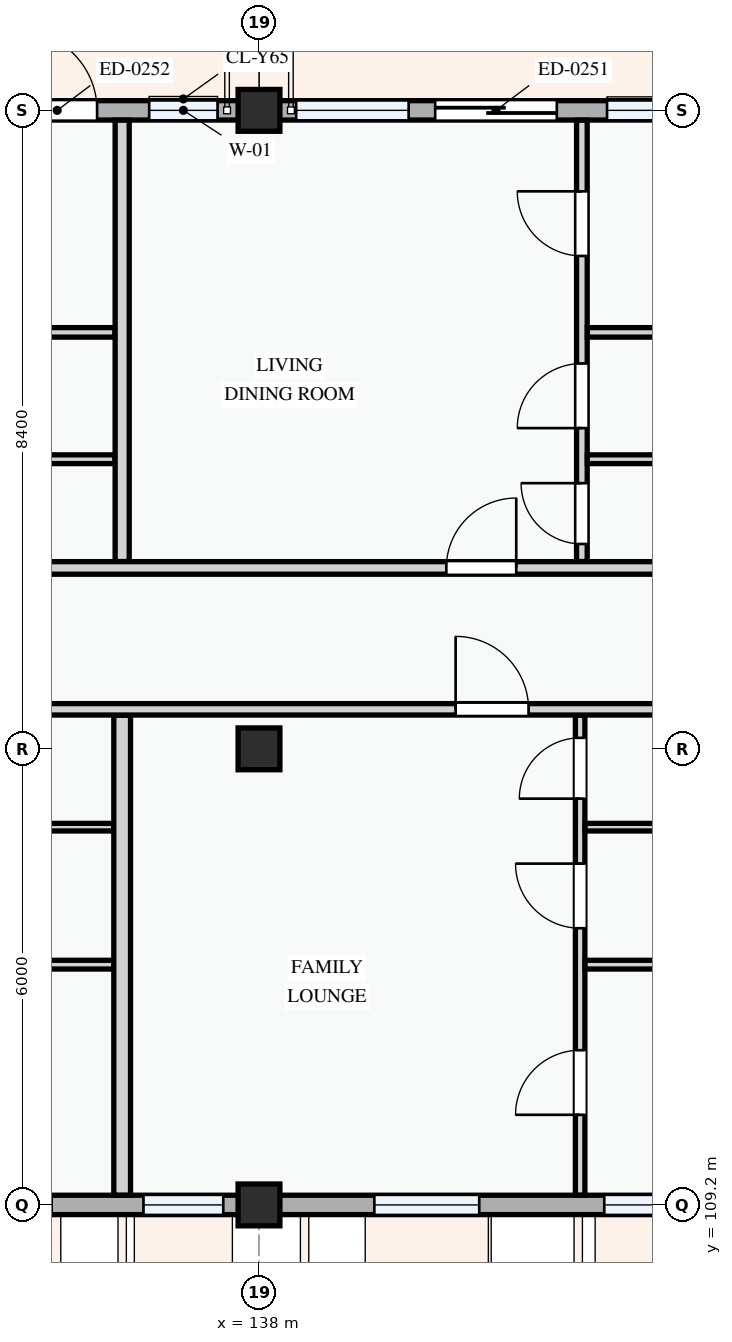
"""IFC4 building model, lengths in metres.
Left out: names, types, materials, properties, quantities, classifications, styles, units other than length and angle.
Written with IfcOpenShell. Run it as: python <this file> out.ifc"""

import sys

from ifc_helpers import new_model, si_unit, direction, frame, frame_2d, origin, origin_2d, place, context, subcontext, project, spatial, rectangle, extrude, element, fill, save


model = new_model("IFC4")
c1 = context("Model", 3, precision=1e-05, world=origin(), true_north=direction((0.0, 1.0)))
c2 = subcontext(c1, "Body", "Model", "MODEL_VIEW")
j1 = project(units=[si_unit("LENGTHUNIT", "METRE"), si_unit("PLANEANGLEUNIT", "RADIAN")], contexts=[c1])
p1 = place(None, origin())
s1 = spatial("IfcSite", under=j1, at=p1, CompositionType="ELEMENT")
p2 = place(p1, origin())
s2 = spatial("IfcBuilding", under=s1, at=p2, CompositionType="ELEMENT")
p3 = place(p2, frame((0.0, 0.0, 34.5)))
s3 = spatial("IfcBuildingStorey", under=s2, at=p3, CompositionType="ELEMENT", Elevation=34.5)
for number, where, z_axis, x_axis in (
    (1, (138.0, 109.2, 0.0), (0.0, 0.0, 1.0), (1.0, 0.0, 0.0)),
    (2, (138.0, 115.2, 0.0), (0.0, 0.0, 1.0), (1.0, 0.0, 0.0)),
    (3, (138.0, 123.6, 0.0), (0.0, 0.0, 1.0), (1.0, 0.0, 0.0)),
):
    element("IfcColumn", number, at=place(p3, frame(where, z_axis=z_axis, x_axis=x_axis)), inside=s3, PredefinedType="COLUMN", context=c2, shape_type="SweptSolid", body=[
        extrude(rectangle(XDim=0.55, YDim=0.55, at=origin_2d()), origin(), (0.0, 0.0, 1.0), 3.3),
    ])
p4 = place(p3, frame((144.0, 123.6, 0.0), z_axis=(0.0, 0.0, 1.0), x_axis=(-1.0, 0.0, 0.0)))
e4 = element("IfcWall", 4, at=p4, inside=s3, PredefinedType="STANDARD", context=c2, shape_type="SweptSolid", body=[
    extrude(rectangle(XDim=6.0, YDim=0.255, at=frame_2d((3.0, 0.0))), origin(), (0.0, 0.0, 1.0), 2.445),
])
p5 = place(p4, frame((2.082, 0.0, 0.0)))
e5 = element("IfcOpeningElement", 5, at=p5, cuts=e4, PredefinedType="OPENING", context=c2, shape_type="SweptSolid", body=[
    extrude(rectangle(XDim=1.6, YDim=2.2, at=frame_2d((0.8, 1.1))), frame((0.0, 0.137, 0.0), z_axis=(0.0, -1.0, 0.0), x_axis=(1.0, 0.0, 0.0)), (0.0, 0.0, 1.0), 0.275),
])
p6 = place(p4, frame((0.521, 0.0, 0.78)))
e6 = element("IfcOpeningElement", 6, at=p6, cuts=e4, PredefinedType="OPENING", context=c2, shape_type="SweptSolid", body=[
    extrude(rectangle(XDim=0.9, YDim=1.2, at=frame_2d((0.45, 0.6))), frame((0.0, 0.137, 0.0), z_axis=(0.0, -1.0, 0.0), x_axis=(1.0, 0.0, 0.0)), (0.0, 0.0, 1.0), 0.275),
])
p7 = place(p4, frame((4.031, 0.0, 0.78)))
e7 = element("IfcOpeningElement", 7, at=p7, cuts=e4, PredefinedType="OPENING", context=c2, shape_type="SweptSolid", body=[
    extrude(rectangle(XDim=1.48, YDim=1.52, at=frame_2d((0.74, 0.76))), frame((0.0, 0.137, 0.0), z_axis=(0.0, -1.0, 0.0), x_axis=(1.0, 0.0, 0.0)), (0.0, 0.0, 1.0), 0.275),
])
p8 = place(p3, frame((138.0, 123.6, 0.0), z_axis=(0.0, 0.0, 1.0), x_axis=(-1.0, 0.0, 0.0)))
e8 = element("IfcWall", 8, at=p8, inside=s3, PredefinedType="STANDARD", context=c2, shape_type="SweptSolid", body=[
    extrude(rectangle(XDim=8.4, YDim=0.255, at=frame_2d((4.2, 0.0))), origin(), (0.0, 0.0, 1.0), 2.345),
])
p9 = place(p8, frame((2.13, 0.0, 0.0)))
e9 = element("IfcOpeningElement", 9, at=p9, cuts=e8, PredefinedType="OPENING", context=c2, shape_type="SweptSolid", body=[
    extrude(rectangle(XDim=1.05, YDim=2.15, at=frame_2d((0.525, 1.075))), frame((0.0, 0.137, 0.0), z_axis=(0.0, -1.0, 0.0), x_axis=(1.0, 0.0, 0.0)), (0.0, 0.0, 1.0), 0.275),
])
p10 = place(p8, frame((0.545, 0.0, 0.78)))
e10 = element("IfcOpeningElement", 10, at=p10, cuts=e8, PredefinedType="OPENING", context=c2, shape_type="SweptSolid", body=[
    extrude(rectangle(XDim=0.9, YDim=1.2, at=frame_2d((0.45, 0.6))), frame((0.0, 0.137, 0.0), z_axis=(0.0, -1.0, 0.0), x_axis=(1.0, 0.0, 0.0)), (0.0, 0.0, 1.0), 0.275),
])
p11 = place(p8, frame((4.06, 0.0, 0.78)))
e11 = element("IfcOpeningElement", 11, at=p11, cuts=e8, PredefinedType="OPENING", context=c2, shape_type="SweptSolid", body=[
    extrude(rectangle(XDim=0.9, YDim=1.2, at=frame_2d((0.45, 0.6))), frame((0.0, 0.137, 0.0), z_axis=(0.0, -1.0, 0.0), x_axis=(1.0, 0.0, 0.0)), (0.0, 0.0, 1.0), 0.275),
])
p12 = place(p8, frame((6.055, 0.0, 0.78)))
e12 = element("IfcOpeningElement", 12, at=p12, cuts=e8, PredefinedType="OPENING", context=c2, shape_type="SweptSolid", body=[
    extrude(rectangle(XDim=1.75, YDim=1.45, at=frame_2d((0.875, 0.725))), frame((0.0, 0.137, 0.0), z_axis=(0.0, -1.0, 0.0), x_axis=(1.0, 0.0, 0.0)), (0.0, 0.0, 1.0), 0.275),
])
p13 = place(p3, frame((129.6, 109.2, 0.0), z_axis=(0.0, 0.0, 1.0), x_axis=(1.0, 0.0, 0.0)))
e13 = element("IfcWall", 13, at=p13, inside=s3, PredefinedType="STANDARD", context=c2, shape_type="SweptSolid", body=[
    extrude(rectangle(XDim=8.4, YDim=0.255, at=frame_2d((4.2, 0.0))), origin(), (0.0, 0.0, 1.0), 2.375),
])
p14 = place(p13, frame((1.353, 0.0, 0.78)))
e14 = element("IfcOpeningElement", 14, at=p14, cuts=e13, PredefinedType="OPENING", context=c2, shape_type="SweptSolid", body=[
    extrude(rectangle(XDim=0.95, YDim=1.15, at=frame_2d((0.475, 0.575))), frame((0.0, 0.137, 0.0), z_axis=(0.0, -1.0, 0.0), x_axis=(1.0, 0.0, 0.0)), (0.0, 0.0, 1.0), 0.275),
])
p15 = place(p13, frame((4.252, 0.0, 0.78)))
e15 = element("IfcOpeningElement", 15, at=p15, cuts=e13, PredefinedType="OPENING", context=c2, shape_type="SweptSolid", body=[
    extrude(rectangle(XDim=1.42, YDim=1.38, at=frame_2d((0.71, 0.69))), frame((0.0, 0.137, 0.0), z_axis=(0.0, -1.0, 0.0), x_axis=(1.0, 0.0, 0.0)), (0.0, 0.0, 1.0), 0.275),
])
p16 = place(p13, frame((6.88, 0.0, 0.78)))
e16 = element("IfcOpeningElement", 16, at=p16, cuts=e13, PredefinedType="OPENING", context=c2, shape_type="SweptSolid", body=[
    extrude(rectangle(XDim=1.05, YDim=1.2, at=frame_2d((0.525, 0.6))), frame((0.0, 0.137, 0.0), z_axis=(0.0, -1.0, 0.0), x_axis=(1.0, 0.0, 0.0)), (0.0, 0.0, 1.0), 0.275),
])
p17 = place(p3, frame((138.0, 109.2, 0.0), z_axis=(0.0, 0.0, 1.0), x_axis=(1.0, 0.0, 0.0)))
e17 = element("IfcWall", 17, at=p17, inside=s3, PredefinedType="STANDARD", context=c2, shape_type="SweptSolid", body=[
    extrude(rectangle(XDim=6.0, YDim=0.255, at=frame_2d((3.0, 0.0))), origin(), (0.0, 0.0, 1.0), 2.525),
])
p18 = place(p17, frame((1.518, 0.0, 0.78)))
e18 = element("IfcOpeningElement", 18, at=p18, cuts=e17, PredefinedType="OPENING", context=c2, shape_type="SweptSolid", body=[
    extrude(rectangle(XDim=1.38, YDim=1.48, at=frame_2d((0.69, 0.74))), frame((0.0, 0.137, 0.0), z_axis=(0.0, -1.0, 0.0), x_axis=(1.0, 0.0, 0.0)), (0.0, 0.0, 1.0), 0.275),
])
p19 = place(p17, frame((4.542, 0.0, 0.78)))
e19 = element("IfcOpeningElement", 19, at=p19, cuts=e17, PredefinedType="OPENING", context=c2, shape_type="SweptSolid", body=[
    extrude(rectangle(XDim=0.95, YDim=1.15, at=frame_2d((0.475, 0.575))), frame((0.0, 0.137, 0.0), z_axis=(0.0, -1.0, 0.0), x_axis=(1.0, 0.0, 0.0)), (0.0, 0.0, 1.0), 0.275),
])
p20 = place(p3, frame((127.879, 112.361, 0.0), z_axis=(0.0, 0.0, 1.0), x_axis=(1.0, 0.0, 0.0)))
e20 = element("IfcWall", 20, at=p20, inside=s3, PredefinedType="PARTITIONING", context=c2, shape_type="SweptSolid", body=[
    extrude(rectangle(XDim=8.208, YDim=0.115, at=frame_2d((4.104, 0.0))), origin(), (0.0, 0.0, 1.0), 3.0),
])
p21 = place(p3, frame((127.879, 114.17, 0.0), z_axis=(0.0, 0.0, 1.0), x_axis=(1.0, 0.0, 0.0)))
e21 = element("IfcWall", 21, at=p21, inside=s3, PredefinedType="PARTITIONING", context=c2, shape_type="SweptSolid", body=[
    extrude(rectangle(XDim=8.208, YDim=0.1, at=frame_2d((4.104, 0.0))), origin(), (0.0, 0.0, 1.0), 3.0),
])
p22 = place(p3, frame((127.9, 120.679, 0.0), z_axis=(0.0, 0.0, 1.0), x_axis=(1.0, 0.0, 0.0)))
e22 = element("IfcWall", 22, at=p22, inside=s3, PredefinedType="PARTITIONING", context=c2, shape_type="SweptSolid", body=[
    extrude(rectangle(XDim=8.206, YDim=0.125, at=frame_2d((4.103, 0.0))), origin(), (0.0, 0.0, 1.0), 3.0),
])
p23 = place(p3, frame((127.9, 119.01, 0.0), z_axis=(0.0, 0.0, 1.0), x_axis=(1.0, 0.0, 0.0)))
e23 = element("IfcWall", 23, at=p23, inside=s3, PredefinedType="PARTITIONING", context=c2, shape_type="SweptSolid", body=[
    extrude(rectangle(XDim=8.206, YDim=0.115, at=frame_2d((4.103, 0.0))), origin(), (0.0, 0.0, 1.0), 3.0),
])
p24 = place(p3, frame((142.225, 109.33, 0.0), z_axis=(0.0, 0.0, 1.0), x_axis=(0.0, 1.0, 0.0)))
e24 = element("IfcWall", 24, at=p24, inside=s3, PredefinedType="PARTITIONING", context=c2, shape_type="SweptSolid", body=[
    extrude(rectangle(XDim=6.313, YDim=0.125, at=frame_2d((3.157, 0.0))), origin(), (0.0, 0.0, 1.0), 3.0),
])
p25 = place(p24, frame((1.056, 0.0, 0.0)))
e25 = element("IfcOpeningElement", 25, at=p25, cuts=e24, PredefinedType="OPENING", context=c2, shape_type="SweptSolid", body=[
    extrude(rectangle(XDim=0.85, YDim=2.1, at=frame_2d((0.425, 1.05))), frame((0.0, 0.073, 0.0), z_axis=(0.0, -1.0, 0.0), x_axis=(1.0, 0.0, 0.0)), (0.0, 0.0, 1.0), 0.145),
])
p26 = place(p24, frame((3.511, 0.0, 0.0)))
e26 = element("IfcOpeningElement", 26, at=p26, cuts=e24, PredefinedType="OPENING", context=c2, shape_type="SweptSolid", body=[
    extrude(rectangle(XDim=0.85, YDim=2.1, at=frame_2d((0.425, 1.05))), frame((0.0, 0.073, 0.0), z_axis=(0.0, -1.0, 0.0), x_axis=(1.0, 0.0, 0.0)), (0.0, 0.0, 1.0), 0.145),
])
p27 = place(p24, frame((5.215, 0.0, 0.0)))
e27 = element("IfcOpeningElement", 27, at=p27, cuts=e24, PredefinedType="OPENING", context=c2, shape_type="SweptSolid", body=[
    extrude(rectangle(XDim=0.8, YDim=2.1, at=frame_2d((0.4, 1.05))), frame((0.0, 0.073, 0.0), z_axis=(0.0, -1.0, 0.0), x_axis=(1.0, 0.0, 0.0)), (0.0, 0.0, 1.0), 0.145),
])
p28 = place(p3, frame((142.29, 112.361, 0.0), z_axis=(0.0, 0.0, 1.0), x_axis=(1.0, 0.0, 0.0)))
e28 = element("IfcWall", 28, at=p28, inside=s3, PredefinedType="PARTITIONING", context=c2, shape_type="SweptSolid", body=[
    extrude(rectangle(XDim=7.683, YDim=0.115, at=frame_2d((3.842, 0.0))), origin(), (0.0, 0.0, 1.0), 3.0),
])
p29 = place(p3, frame((142.29, 114.17, 0.0), z_axis=(0.0, 0.0, 1.0), x_axis=(1.0, 0.0, 0.0)))
e29 = element("IfcWall", 29, at=p29, inside=s3, PredefinedType="PARTITIONING", context=c2, shape_type="SweptSolid", body=[
    extrude(rectangle(XDim=7.683, YDim=0.1, at=frame_2d((3.842, 0.0))), origin(), (0.0, 0.0, 1.0), 3.0),
])
p30 = place(p3, frame((142.248, 117.665, 0.0), z_axis=(0.0, 0.0, 1.0), x_axis=(0.0, 1.0, 0.0)))
e30 = element("IfcWall", 30, at=p30, inside=s3, PredefinedType="PARTITIONING", context=c2, shape_type="SweptSolid", body=[
    extrude(rectangle(XDim=5.806, YDim=0.14, at=frame_2d((2.903, 0.0))), origin(), (0.0, 0.0, 1.0), 3.0),
])
p31 = place(p30, frame((0.231, 0.0, 0.0)))
e31 = element("IfcOpeningElement", 31, at=p31, cuts=e30, PredefinedType="OPENING", context=c2, shape_type="SweptSolid", body=[
    extrude(rectangle(XDim=0.8, YDim=2.1, at=frame_2d((0.4, 1.05))), frame((0.0, 0.08, 0.0), z_axis=(0.0, -1.0, 0.0), x_axis=(1.0, 0.0, 0.0)), (0.0, 0.0, 1.0), 0.16),
])
p32 = place(p30, frame((1.755, 0.0, 0.0)))
e32 = element("IfcOpeningElement", 32, at=p32, cuts=e30, PredefinedType="OPENING", context=c2, shape_type="SweptSolid", body=[
    extrude(rectangle(XDim=0.85, YDim=2.1, at=frame_2d((0.425, 1.05))), frame((0.0, 0.08, 0.0), z_axis=(0.0, -1.0, 0.0), x_axis=(1.0, 0.0, 0.0)), (0.0, 0.0, 1.0), 0.16),
])
p33 = place(p30, frame((4.02, 0.0, 0.0)))
e33 = element("IfcOpeningElement", 33, at=p33, cuts=e30, PredefinedType="OPENING", context=c2, shape_type="SweptSolid", body=[
    extrude(rectangle(XDim=0.85, YDim=2.1, at=frame_2d((0.425, 1.05))), frame((0.0, 0.08, 0.0), z_axis=(0.0, -1.0, 0.0), x_axis=(1.0, 0.0, 0.0)), (0.0, 0.0, 1.0), 0.16),
])
p34 = place(p3, frame((142.32, 120.679, 0.0), z_axis=(0.0, 0.0, 1.0), x_axis=(1.0, 0.0, 0.0)))
e34 = element("IfcWall", 34, at=p34, inside=s3, PredefinedType="PARTITIONING", context=c2, shape_type="SweptSolid", body=[
    extrude(rectangle(XDim=7.73, YDim=0.125, at=frame_2d((3.865, 0.0))), origin(), (0.0, 0.0, 1.0), 3.0),
])
p35 = place(p3, frame((142.32, 119.01, 0.0), z_axis=(0.0, 0.0, 1.0), x_axis=(1.0, 0.0, 0.0)))
e35 = element("IfcWall", 35, at=p35, inside=s3, PredefinedType="PARTITIONING", context=c2, shape_type="SweptSolid", body=[
    extrude(rectangle(XDim=7.73, YDim=0.115, at=frame_2d((3.865, 0.0))), origin(), (0.0, 0.0, 1.0), 3.0),
])
p36 = place(p3, frame((136.2, 109.33, 0.0), z_axis=(0.0, 0.0, 1.0), x_axis=(0.0, 1.0, 0.0)))
e36 = element("IfcWall", 36, at=p36, inside=s3, PredefinedType="PARTITIONING", context=c2, shape_type="SweptSolid", body=[
    extrude(rectangle(XDim=6.313, YDim=0.22, at=frame_2d((3.157, 0.0))), origin(), (0.0, 0.0, 1.0), 3.0),
])
p37 = place(p3, frame((136.2, 117.665, 0.0), z_axis=(0.0, 0.0, 1.0), x_axis=(0.0, 1.0, 0.0)))
e37 = element("IfcWall", 37, at=p37, inside=s3, PredefinedType="PARTITIONING", context=c2, shape_type="SweptSolid", body=[
    extrude(rectangle(XDim=5.806, YDim=0.185, at=frame_2d((2.903, 0.0))), origin(), (0.0, 0.0, 1.0), 3.0),
])
p38 = place(p3, frame((109.33, 115.72, 0.0), z_axis=(0.0, 0.0, 1.0), x_axis=(1.0, 0.0, 0.0)))
e38 = element("IfcWall", 38, at=p38, inside=s3, PredefinedType="PARTITIONING", context=c2, shape_type="SweptSolid", body=[
    extrude(rectangle(XDim=40.72, YDim=0.15, at=frame_2d((20.36, 0.0))), origin(), (0.0, 0.0, 1.0), 3.0),
])
p39 = place(p38, frame((2.32, 0.0, 0.0)))
e39 = element("IfcOpeningElement", 39, at=p39, cuts=e38, PredefinedType="OPENING", context=c2, shape_type="SweptSolid", body=[
    extrude(rectangle(XDim=0.92, YDim=2.1, at=frame_2d((0.46, 1.05))), frame((0.0, 0.085, 0.0), z_axis=(0.0, -1.0, 0.0), x_axis=(1.0, 0.0, 0.0)), (0.0, 0.0, 1.0), 0.17),
])
p40 = place(p38, frame((16.851, 0.0, 0.0)))
e40 = element("IfcOpeningElement", 40, at=p40, cuts=e38, PredefinedType="OPENING", context=c2, shape_type="SweptSolid", body=[
    extrude(rectangle(XDim=0.92, YDim=2.1, at=frame_2d((0.46, 1.05))), frame((0.0, 0.085, 0.0), z_axis=(0.0, -1.0, 0.0), x_axis=(1.0, 0.0, 0.0)), (0.0, 0.0, 1.0), 0.17),
])
p41 = place(p38, frame((31.258, 0.0, 0.0)))
e41 = element("IfcOpeningElement", 41, at=p41, cuts=e38, PredefinedType="OPENING", context=c2, shape_type="SweptSolid", body=[
    extrude(rectangle(XDim=0.96, YDim=2.12, at=frame_2d((0.48, 1.06))), frame((0.0, 0.085, 0.0), z_axis=(0.0, -1.0, 0.0), x_axis=(1.0, 0.0, 0.0)), (0.0, 0.0, 1.0), 0.17),
])
p42 = place(p3, frame((109.33, 117.58, 0.0), z_axis=(0.0, 0.0, 1.0), x_axis=(1.0, 0.0, 0.0)))
e42 = element("IfcWall", 42, at=p42, inside=s3, PredefinedType="PARTITIONING", context=c2, shape_type="SweptSolid", body=[
    extrude(rectangle(XDim=43.21, YDim=0.165, at=frame_2d((21.605, 0.0))), origin(), (0.0, 0.0, 1.0), 3.0),
])
p43 = place(p42, frame((2.337, 0.0, 0.0)))
e43 = element("IfcOpeningElement", 43, at=p43, cuts=e42, PredefinedType="OPENING", context=c2, shape_type="SweptSolid", body=[
    extrude(rectangle(XDim=0.92, YDim=2.1, at=frame_2d((0.46, 1.05))), frame((0.0, 0.093, 0.0), z_axis=(0.0, -1.0, 0.0), x_axis=(1.0, 0.0, 0.0)), (0.0, 0.0, 1.0), 0.185),
])
p44 = place(p42, frame((16.721, 0.0, 0.0)))
e44 = element("IfcOpeningElement", 44, at=p44, cuts=e42, PredefinedType="OPENING", context=c2, shape_type="SweptSolid", body=[
    extrude(rectangle(XDim=0.92, YDim=2.1, at=frame_2d((0.46, 1.05))), frame((0.0, 0.093, 0.0), z_axis=(0.0, -1.0, 0.0), x_axis=(1.0, 0.0, 0.0)), (0.0, 0.0, 1.0), 0.185),
])
p45 = place(p42, frame((31.135, 0.0, 0.0)))
e45 = element("IfcOpeningElement", 45, at=p45, cuts=e42, PredefinedType="OPENING", context=c2, shape_type="SweptSolid", body=[
    extrude(rectangle(XDim=0.92, YDim=2.1, at=frame_2d((0.46, 1.05))), frame((0.0, 0.093, 0.0), z_axis=(0.0, -1.0, 0.0), x_axis=(1.0, 0.0, 0.0)), (0.0, 0.0, 1.0), 0.185),
])
p46 = place(p5, frame((1.6, 0.0, 0.0), z_axis=(0.0, 0.0, 1.0), x_axis=(-1.0, 0.0, 0.0)))
e46 = element("IfcDoor", 46, at=p46, inside=s3, OperationType="SLIDING_TO_LEFT", PredefinedType="DOOR", context=c2, shape_type="SweptSolid", body=[
    extrude(rectangle(XDim=1.6, YDim=2.2, at=frame_2d((0.8, 1.1))), frame((0.0, 0.025, 0.0), z_axis=(0.0, -1.0, 0.0), x_axis=(1.0, 0.0, 0.0)), (0.0, 0.0, 1.0), 0.05),
])
fill(e5, e46)
p47 = place(p6, origin())
e47 = element("IfcWindow", 47, at=p47, inside=s3, PartitioningType="SINGLE_PANEL", PredefinedType="WINDOW", context=c2, shape_type="SweptSolid", body=[
    extrude(rectangle(XDim=0.9, YDim=1.2, at=frame_2d((0.45, 0.6))), frame((0.0, 0.03, 0.0), z_axis=(0.0, -1.0, 0.0), x_axis=(1.0, 0.0, 0.0)), (0.0, 0.0, 1.0), 0.06),
])
fill(e6, e47)
p48 = place(p7, origin())
e48 = element("IfcWindow", 48, at=p48, inside=s3, PartitioningType="SINGLE_PANEL", PredefinedType="WINDOW", context=c2, shape_type="SweptSolid", body=[
    extrude(rectangle(XDim=1.48, YDim=1.52, at=frame_2d((0.74, 0.76))), frame((0.0, 0.03, 0.0), z_axis=(0.0, -1.0, 0.0), x_axis=(1.0, 0.0, 0.0)), (0.0, 0.0, 1.0), 0.06),
])
fill(e7, e48)
p49 = place(p9, frame((1.05, 0.0, 0.0), z_axis=(0.0, 0.0, 1.0), x_axis=(-1.0, 0.0, 0.0)))
e49 = element("IfcDoor", 49, at=p49, inside=s3, OperationType="SINGLE_SWING_LEFT", PredefinedType="DOOR", context=c2, shape_type="SweptSolid", body=[
    extrude(rectangle(XDim=1.05, YDim=2.15, at=frame_2d((0.525, 1.075))), frame((0.0, 0.025, 0.0), z_axis=(0.0, -1.0, 0.0), x_axis=(1.0, 0.0, 0.0)), (0.0, 0.0, 1.0), 0.05),
])
fill(e9, e49)
p50 = place(p10, origin())
e50 = element("IfcWindow", 50, at=p50, inside=s3, PartitioningType="SINGLE_PANEL", PredefinedType="WINDOW", context=c2, shape_type="SweptSolid", body=[
    extrude(rectangle(XDim=0.9, YDim=1.2, at=frame_2d((0.45, 0.6))), frame((0.0, 0.03, 0.0), z_axis=(0.0, -1.0, 0.0), x_axis=(1.0, 0.0, 0.0)), (0.0, 0.0, 1.0), 0.06),
])
fill(e10, e50)
p51 = place(p16, origin())
e51 = element("IfcWindow", 51, at=p51, inside=s3, PartitioningType="SINGLE_PANEL", PredefinedType="WINDOW", context=c2, shape_type="SweptSolid", body=[
    extrude(rectangle(XDim=1.05, YDim=1.2, at=frame_2d((0.525, 0.6))), frame((0.0, 0.03, 0.0), z_axis=(0.0, -1.0, 0.0), x_axis=(1.0, 0.0, 0.0)), (0.0, 0.0, 1.0), 0.06),
])
fill(e16, e51)
p52 = place(p18, origin())
e52 = element("IfcWindow", 52, at=p52, inside=s3, PartitioningType="SINGLE_PANEL", PredefinedType="WINDOW", context=c2, shape_type="SweptSolid", body=[
    extrude(rectangle(XDim=1.38, YDim=1.48, at=frame_2d((0.69, 0.74))), frame((0.0, 0.03, 0.0), z_axis=(0.0, -1.0, 0.0), x_axis=(1.0, 0.0, 0.0)), (0.0, 0.0, 1.0), 0.06),
])
fill(e18, e52)
p53 = place(p19, origin())
e53 = element("IfcWindow", 53, at=p53, inside=s3, PartitioningType="SINGLE_PANEL", PredefinedType="WINDOW", context=c2, shape_type="SweptSolid", body=[
    extrude(rectangle(XDim=0.95, YDim=1.15, at=frame_2d((0.475, 0.575))), frame((0.0, 0.03, 0.0), z_axis=(0.0, -1.0, 0.0), x_axis=(1.0, 0.0, 0.0)), (0.0, 0.0, 1.0), 0.06),
])
fill(e19, e53)
p54 = place(p25, origin())
e54 = element("IfcDoor", 54, at=p54, inside=s3, OperationType="SINGLE_SWING_LEFT", PredefinedType="DOOR", context=c2, shape_type="SweptSolid", body=[
    extrude(rectangle(XDim=0.85, YDim=2.1, at=frame_2d((0.425, 1.05))), frame((0.0, 0.025, 0.0), z_axis=(0.0, -1.0, 0.0), x_axis=(1.0, 0.0, 0.0)), (0.0, 0.0, 1.0), 0.05),
])
fill(e25, e54)
p55 = place(p26, origin())
e55 = element("IfcDoor", 55, at=p55, inside=s3, OperationType="SINGLE_SWING_RIGHT", PredefinedType="DOOR", context=c2, shape_type="SweptSolid", body=[
    extrude(rectangle(XDim=0.85, YDim=2.1, at=frame_2d((0.425, 1.05))), frame((0.0, 0.025, 0.0), z_axis=(0.0, -1.0, 0.0), x_axis=(1.0, 0.0, 0.0)), (0.0, 0.0, 1.0), 0.05),
])
fill(e26, e55)
p56 = place(p27, origin())
e56 = element("IfcDoor", 56, at=p56, inside=s3, OperationType="SINGLE_SWING_LEFT", PredefinedType="DOOR", context=c2, shape_type="SweptSolid", body=[
    extrude(rectangle(XDim=0.8, YDim=2.1, at=frame_2d((0.4, 1.05))), frame((0.0, 0.025, 0.0), z_axis=(0.0, -1.0, 0.0), x_axis=(1.0, 0.0, 0.0)), (0.0, 0.0, 1.0), 0.05),
])
fill(e27, e56)
p57 = place(p31, origin())
e57 = element("IfcDoor", 57, at=p57, inside=s3, OperationType="SINGLE_SWING_RIGHT", PredefinedType="DOOR", context=c2, shape_type="SweptSolid", body=[
    extrude(rectangle(XDim=0.8, YDim=2.1, at=frame_2d((0.4, 1.05))), frame((0.0, 0.025, 0.0), z_axis=(0.0, -1.0, 0.0), x_axis=(1.0, 0.0, 0.0)), (0.0, 0.0, 1.0), 0.05),
])
fill(e31, e57)
p58 = place(p32, origin())
e58 = element("IfcDoor", 58, at=p58, inside=s3, OperationType="SINGLE_SWING_LEFT", PredefinedType="DOOR", context=c2, shape_type="SweptSolid", body=[
    extrude(rectangle(XDim=0.85, YDim=2.1, at=frame_2d((0.425, 1.05))), frame((0.0, 0.025, 0.0), z_axis=(0.0, -1.0, 0.0), x_axis=(1.0, 0.0, 0.0)), (0.0, 0.0, 1.0), 0.05),
])
fill(e32, e58)
p59 = place(p33, origin())
e59 = element("IfcDoor", 59, at=p59, inside=s3, OperationType="SINGLE_SWING_RIGHT", PredefinedType="DOOR", context=c2, shape_type="SweptSolid", body=[
    extrude(rectangle(XDim=0.85, YDim=2.1, at=frame_2d((0.425, 1.05))), frame((0.0, 0.025, 0.0), z_axis=(0.0, -1.0, 0.0), x_axis=(1.0, 0.0, 0.0)), (0.0, 0.0, 1.0), 0.05),
])
fill(e33, e59)
p60 = place(p41, origin())
e60 = element("IfcDoor", 60, at=p60, inside=s3, OperationType="SINGLE_SWING_LEFT", PredefinedType="DOOR", context=c2, shape_type="SweptSolid", body=[
    extrude(rectangle(XDim=0.96, YDim=2.12, at=frame_2d((0.48, 1.06))), frame((0.0, 0.025, 0.0), z_axis=(0.0, -1.0, 0.0), x_axis=(1.0, 0.0, 0.0)), (0.0, 0.0, 1.0), 0.05),
])
fill(e41, e60)
p61 = place(p45, origin())
e61 = element("IfcDoor", 61, at=p61, inside=s3, OperationType="SINGLE_SWING_RIGHT", PredefinedType="DOOR", context=c2, shape_type="SweptSolid", body=[
    extrude(rectangle(XDim=0.92, YDim=2.1, at=frame_2d((0.46, 1.05))), frame((0.0, 0.025, 0.0), z_axis=(0.0, -1.0, 0.0), x_axis=(1.0, 0.0, 0.0)), (0.0, 0.0, 1.0), 0.05),
])
fill(e45, e61)
save(model, sys.argv[1])
